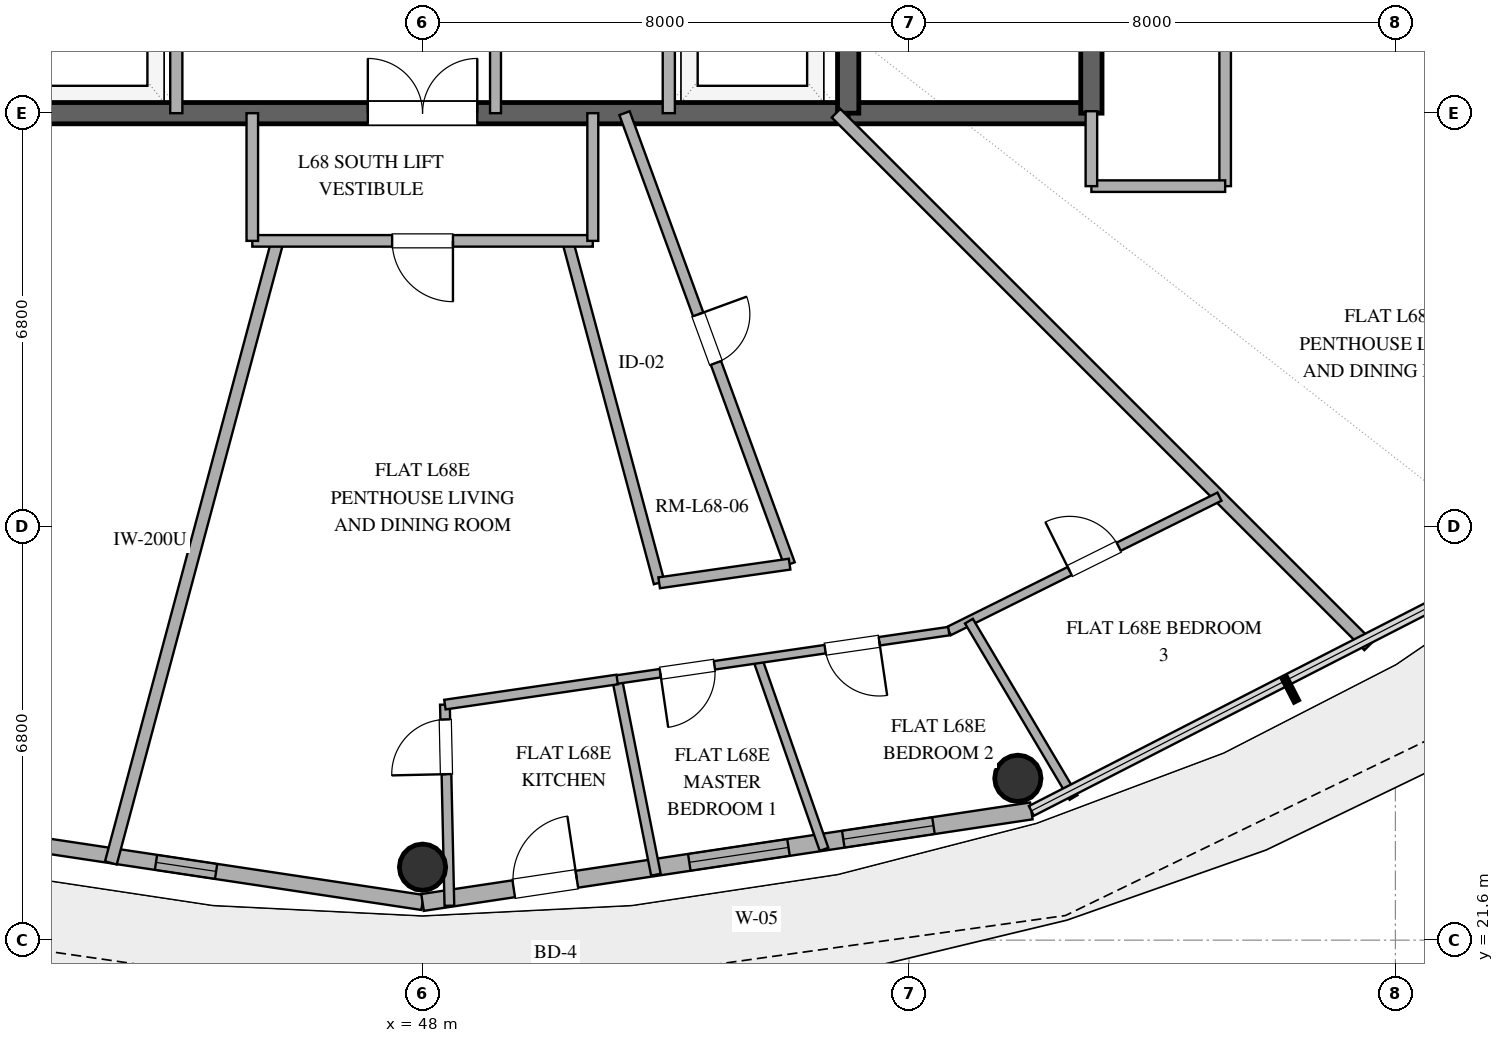
"""IFC4 building model, lengths in metres.
Left out: names, types, materials, properties, quantities, classifications, styles, units other than length and angle.
Written with IfcOpenShell. Run it as: python <this file> out.ifc"""

import sys

from ifc_helpers import new_model, si_unit, direction, frame, frame_2d, origin, origin_2d, place, context, subcontext, project, spatial, rectangle, hollow_circle, extrude, element, fill, save


model = new_model("IFC4")
c1 = context("Model", 3, precision=1e-05, world=origin(), true_north=direction((0.0, 1.0)))
c2 = subcontext(c1, "Body", "Model", "MODEL_VIEW")
j1 = project(units=[si_unit("LENGTHUNIT", "METRE"), si_unit("PLANEANGLEUNIT", "RADIAN")], contexts=[c1])
p1 = place(None, origin())
s1 = spatial("IfcSite", under=j1, at=p1, CompositionType="ELEMENT")
p2 = place(p1, origin())
s2 = spatial("IfcBuilding", under=s1, at=p2, CompositionType="ELEMENT")
p3 = place(p2, frame((0.0, 0.0, 265.8)))
s3 = spatial("IfcBuildingStorey", under=s2, at=p3, CompositionType="ELEMENT", Elevation=265.8)
p4 = place(p3, frame((41.0, 35.2, 0.0), z_axis=(0.0, 0.0, 1.0), x_axis=(1.0, 0.0, 0.0)))
e1 = element("IfcWall", 1, at=p4, inside=s3, PredefinedType="SHEAR", context=c2, shape_type="SweptSolid", body=[
    extrude(rectangle(XDim=14.0, YDim=0.35, at=frame_2d((7.0, 0.0))), origin(), (0.0, 0.0, 1.0), 3.37),
])
p5 = place(p4, frame((6.1, 0.0, 0.0)))
e2 = element("IfcOpeningElement", 2, at=p5, cuts=e1, PredefinedType="OPENING", context=c2, shape_type="SweptSolid", body=[
    extrude(rectangle(XDim=1.8, YDim=2.25, at=frame_2d((0.9, 1.125))), frame((0.0, 0.185, 0.0), z_axis=(0.0, -1.0, 0.0), x_axis=(1.0, 0.0, 0.0)), (0.0, 0.0, 1.0), 0.37),
])
p6 = place(p3, frame((55.0, 35.2, 0.0), z_axis=(0.0, 0.0, 1.0), x_axis=(1.0, 0.0, 0.0)))
e3 = element("IfcWall", 3, at=p6, inside=s3, PredefinedType="SHEAR", context=c2, shape_type="SweptSolid", body=[
    extrude(rectangle(XDim=4.0, YDim=0.35, at=frame_2d((2.0, 0.0))), origin(), (0.0, 0.0, 1.0), 3.37),
])
p7 = place(p3, frame((59.0, 35.2, 0.0), z_axis=(0.0, 0.0, 1.0), x_axis=(0.0, 1.0, 0.0)))
e4 = element("IfcWall", 4, at=p7, inside=s3, PredefinedType="SHEAR", context=c2, shape_type="SweptSolid", body=[
    extrude(rectangle(XDim=13.6, YDim=0.35, at=frame_2d((6.8, 0.0))), origin(), (0.0, 0.0, 1.0), 3.37),
])
p8 = place(p7, frame((1.5, 0.0, 0.0)))
e5 = element("IfcOpeningElement", 5, at=p8, cuts=e4, PredefinedType="OPENING", context=c2, shape_type="SweptSolid", body=[
    extrude(rectangle(XDim=1.2, YDim=2.15, at=frame_2d((0.6, 1.075))), frame((0.0, 0.185, 0.0), z_axis=(0.0, -1.0, 0.0), x_axis=(1.0, 0.0, 0.0)), (0.0, 0.0, 1.0), 0.37),
])
p9 = place(p3, frame((55.0, 35.2, 0.0), z_axis=(0.0, 0.0, 1.0), x_axis=(0.0, 1.0, 0.0)))
e6 = element("IfcWall", 6, at=p9, inside=s3, PredefinedType="SHEAR", context=c2, shape_type="SweptSolid", body=[
    extrude(rectangle(XDim=13.6, YDim=0.35, at=frame_2d((6.8, 0.0))), origin(), (0.0, 0.0, 1.0), 3.37),
])
p10 = place(p9, frame((1.15, 0.0, 0.0)))
e7 = element("IfcOpeningElement", 7, at=p10, cuts=e6, PredefinedType="OPENING", context=c2, shape_type="SweptSolid", body=[
    extrude(rectangle(XDim=1.1, YDim=2.2, at=frame_2d((0.55, 1.1))), frame((0.0, 0.185, 0.0), z_axis=(0.0, -1.0, 0.0), x_axis=(1.0, 0.0, 0.0)), (0.0, 0.0, 1.0), 0.37),
])
for number, where, z_axis, x_axis in (
    (8, (48.0, 22.8, 0.0), (0.0, 0.0, 1.0), (1.0, 0.0, 0.0)),
    (9, (57.791, 24.261, 0.0), (0.0, 0.0, 1.0), (1.0, 0.0, 0.0)),
):
    element("IfcColumn", number, at=place(p3, frame(where, z_axis=z_axis, x_axis=x_axis)), inside=s3, PredefinedType="COLUMN", context=c2, shape_type="SweptSolid", body=[
        extrude(hollow_circle(Radius=0.381, WallThickness=0.025, at=origin_2d()), origin(), (0.0, 0.0, 1.0), 3.37),
    ])
p11 = place(p3, frame((37.987, 23.726, 0.0), z_axis=(0.0, 0.0, 1.0), x_axis=(0.988882522213, -0.148698881169, 0.0)))
e10 = element("IfcWall", 10, at=p11, inside=s3, PredefinedType="SOLIDWALL", context=c2, shape_type="SweptSolid", body=[
    extrude(rectangle(XDim=10.125, YDim=0.25, at=frame_2d((5.062, 0.0))), origin(), (0.0, 0.0, 1.0), 3.37),
])
p12 = place(p11, frame((5.692, 0.0, 0.35)))
e11 = element("IfcOpeningElement", 11, at=p12, cuts=e10, PredefinedType="OPENING", context=c2, shape_type="SweptSolid", body=[
    extrude(rectangle(XDim=1.0, YDim=1.05, at=frame_2d((0.5, 0.525))), frame((0.0, 0.135, 0.0), z_axis=(0.0, -1.0, 0.0), x_axis=(1.0, 0.0, 0.0)), (0.0, 0.0, 1.0), 0.27),
])
p13 = place(p3, frame((48.0, 22.22, 0.0), z_axis=(0.0, 0.0, 1.0), x_axis=(0.988882522213, 0.148698881169, 0.0)))
e12 = element("IfcWall", 12, at=p13, inside=s3, PredefinedType="SOLIDWALL", context=c2, shape_type="SweptSolid", body=[
    extrude(rectangle(XDim=10.125, YDim=0.28, at=frame_2d((5.062, 0.0))), origin(), (0.0, 0.0, 1.0), 3.37),
])
p14 = place(p13, frame((1.516, 0.0, 0.0)))
e13 = element("IfcOpeningElement", 13, at=p14, cuts=e12, PredefinedType="OPENING", context=c2, shape_type="SweptSolid", body=[
    extrude(rectangle(XDim=1.05, YDim=2.2, at=frame_2d((0.525, 1.1))), frame((0.0, 0.15, 0.0), z_axis=(0.0, -1.0, 0.0), x_axis=(1.0, 0.0, 0.0)), (0.0, 0.0, 1.0), 0.3),
])
p15 = place(p13, frame((4.436, 0.0, 0.85)))
e14 = element("IfcOpeningElement", 14, at=p15, cuts=e12, PredefinedType="OPENING", context=c2, shape_type="SweptSolid", body=[
    extrude(rectangle(XDim=1.65, YDim=2.0, at=frame_2d((0.825, 1.0))), frame((0.0, 0.15, 0.0), z_axis=(0.0, -1.0, 0.0), x_axis=(1.0, 0.0, 0.0)), (0.0, 0.0, 1.0), 0.3),
])
p16 = place(p13, frame((6.997, 0.0, 0.85)))
e15 = element("IfcOpeningElement", 15, at=p16, cuts=e12, PredefinedType="OPENING", context=c2, shape_type="SweptSolid", body=[
    extrude(rectangle(XDim=1.5, YDim=2.0, at=frame_2d((0.75, 1.0))), frame((0.0, 0.15, 0.0), z_axis=(0.0, -1.0, 0.0), x_axis=(1.0, 0.0, 0.0)), (0.0, 0.0, 1.0), 0.3),
])
for number, where, z_axis, x_axis in (
    (16, (43.95, 35.2, 0.0), (0.0, 0.0, 1.0), (0.0, 1.0, 0.0)),
    (17, (52.05, 35.2, 0.0), (0.0, 0.0, 1.0), (0.0, 1.0, 0.0)),
):
    element("IfcWall", number, at=place(p3, frame(where, z_axis=z_axis, x_axis=x_axis)), inside=s3, PredefinedType="SOLIDWALL", context=c2, shape_type="SweptSolid", body=[
        extrude(rectangle(XDim=3.2, YDim=0.2, at=frame_2d((1.6, 0.0))), origin(), (0.0, 0.0, 1.0), 2.73),
    ])
p17 = place(p3, frame((49.2, 35.2, 0.0), z_axis=(0.0, 0.0, 1.0), x_axis=(0.0, 1.0, 0.0)))
e18 = element("IfcWall", 18, at=p17, inside=s3, PredefinedType="PLUMBINGWALL", context=c2, shape_type="SweptSolid", body=[
    extrude(rectangle(XDim=3.2, YDim=0.18, at=frame_2d((1.6, 0.0))), origin(), (0.0, 0.0, 1.0), 2.73),
])
p18 = place(p17, frame((1.15, 0.0, 0.0)))
e19 = element("IfcOpeningElement", 19, at=p18, cuts=e18, PredefinedType="OPENING", context=c2, shape_type="SweptSolid", body=[
    extrude(rectangle(XDim=0.9, YDim=2.1, at=frame_2d((0.45, 1.05))), frame((0.0, 0.1, 0.0), z_axis=(0.0, -1.0, 0.0), x_axis=(1.0, 0.0, 0.0)), (0.0, 0.0, 1.0), 0.2),
])
p19 = place(p3, frame((42.874, 22.87, 0.0), z_axis=(0.0, 0.0, 1.0), x_axis=(0.258827496332, 0.965923561749, 0.0)))
e20 = element("IfcWall", 20, at=p19, inside=s3, PredefinedType="PARTITIONING", context=c2, shape_type="SweptSolid", body=[
    extrude(rectangle(XDim=10.591, YDim=0.2, at=frame_2d((5.295, 0.0))), origin(), (0.0, 0.0, 1.0), 2.73),
])
p20 = place(p3, frame((63.561, 26.439, 0.0), z_axis=(0.0, 0.0, 1.0), x_axis=(-0.707106781187, 0.707106781187, 0.0)))
e21 = element("IfcWall", 21, at=p20, inside=s3, PredefinedType="PARTITIONING", context=c2, shape_type="SweptSolid", body=[
    extrude(rectangle(XDim=12.389, YDim=0.2, at=frame_2d((6.195, 0.0))), origin(), (0.0, 0.0, 1.0), 2.73),
])
p21 = place(p3, frame((51.322, 35.2, 0.0), z_axis=(0.0, 0.0, 1.0), x_axis=(0.343730484072, -0.939068343796, 0.0)))
e22 = element("IfcWall", 22, at=p21, inside=s3, PredefinedType="PLUMBINGWALL", context=c2, shape_type="SweptSolid", body=[
    extrude(rectangle(XDim=7.897, YDim=0.18, at=frame_2d((3.949, 0.0))), origin(), (0.0, 0.0, 1.0), 2.73),
])
p22 = place(p21, frame((3.524, 0.0, 0.0)))
e23 = element("IfcOpeningElement", 23, at=p22, cuts=e22, PredefinedType="OPENING", context=c2, shape_type="SweptSolid", body=[
    extrude(rectangle(XDim=0.85, YDim=2.1, at=frame_2d((0.425, 1.05))), frame((0.0, 0.1, 0.0), z_axis=(0.0, -1.0, 0.0), x_axis=(1.0, 0.0, 0.0)), (0.0, 0.0, 1.0), 0.2),
])
p23 = place(p3, frame((51.892, 27.477, 0.0), z_axis=(0.0, 0.0, 1.0), x_axis=(-0.258831810373, 0.965922405755, 0.0)))
e24 = element("IfcWall", 24, at=p23, inside=s3, PredefinedType="PLUMBINGWALL", context=c2, shape_type="SweptSolid", body=[
    extrude(rectangle(XDim=5.822, YDim=0.18, at=frame_2d((2.911, 0.0))), origin(), (0.0, 0.0, 1.0), 2.73),
])
p24 = place(p3, frame((50.8, 33.1, 0.0), z_axis=(0.0, 0.0, 1.0), x_axis=(-1.0, 0.0, 0.0)))
e25 = element("IfcWall", 25, at=p24, inside=s3, PredefinedType="PARTITIONING", context=c2, shape_type="SweptSolid", body=[
    extrude(rectangle(XDim=5.6, YDim=0.19, at=frame_2d((2.8, 0.0))), origin(), (0.0, 0.0, 1.0), 2.73),
])
p25 = place(p24, frame((2.3, 0.0, 0.0)))
e26 = element("IfcOpeningElement", 26, at=p25, cuts=e25, PredefinedType="OPENING", context=c2, shape_type="SweptSolid", body=[
    extrude(rectangle(XDim=1.0, YDim=2.2, at=frame_2d((0.5, 1.1))), frame((0.0, 0.105, 0.0), z_axis=(0.0, -1.0, 0.0), x_axis=(1.0, 0.0, 0.0)), (0.0, 0.0, 1.0), 0.21),
])
p26 = place(p3, frame((56.655, 26.682, 0.0), z_axis=(0.0, 0.0, 1.0), x_axis=(0.895583327025, 0.444893812449, 0.0)))
e27 = element("IfcWall", 27, at=p26, inside=s3, PredefinedType="PARTITIONING", context=c2, shape_type="SweptSolid", body=[
    extrude(rectangle(XDim=4.971, YDim=0.15, at=frame_2d((2.485, 0.0))), origin(), (0.0, 0.0, 1.0), 2.73),
])
p27 = place(p26, frame((2.22, 0.0, 0.0)))
e28 = element("IfcOpeningElement", 28, at=p27, cuts=e27, PredefinedType="OPENING", context=c2, shape_type="SweptSolid", body=[
    extrude(rectangle(XDim=0.9, YDim=2.1, at=frame_2d((0.45, 1.05))), frame((0.0, 0.085, 0.0), z_axis=(0.0, -1.0, 0.0), x_axis=(1.0, 0.0, 0.0)), (0.0, 0.0, 1.0), 0.17),
])
p28 = place(p3, frame((61.2, 38.496, 0.0), z_axis=(0.0, 0.0, 1.0), x_axis=(0.0, -1.0, 0.0)))
e29 = element("IfcWall", 29, at=p28, inside=s3, PredefinedType="PARTITIONING", context=c2, shape_type="SweptSolid", body=[
    extrude(rectangle(XDim=4.496, YDim=0.19, at=frame_2d((2.248, 0.0))), origin(), (0.0, 0.0, 1.0), 2.73),
])
p29 = place(p3, frame((58.706, 23.946, 0.0), z_axis=(0.0, 0.0, 1.0), x_axis=(-0.510016720958, 0.860164486795, 0.0)))
e30 = element("IfcWall", 30, at=p29, inside=s3, PredefinedType="PARTITIONING", context=c2, shape_type="SweptSolid", body=[
    extrude(rectangle(XDim=3.372, YDim=0.15, at=frame_2d((1.686, 0.0))), origin(), (0.0, 0.0, 1.0), 2.73),
])
p30 = place(p3, frame((53.51, 26.223, 0.0), z_axis=(0.0, 0.0, 1.0), x_axis=(0.329694293347, -0.944087746417, 0.0)))
e31 = element("IfcWall", 31, at=p30, inside=s3, PredefinedType="PARTITIONING", context=c2, shape_type="SweptSolid", body=[
    extrude(rectangle(XDim=3.315, YDim=0.15, at=frame_2d((1.658, 0.0))), origin(), (0.0, 0.0, 1.0), 2.73),
])
p31 = place(p3, frame((48.442, 22.166, 0.0), z_axis=(0.0, 0.0, 1.0), x_axis=(-0.022285576985, 0.999751645689, 0.0)))
e32 = element("IfcWall", 32, at=p31, inside=s3, PredefinedType="PLUMBINGWALL", context=c2, shape_type="SweptSolid", body=[
    extrude(rectangle(XDim=3.308, YDim=0.16, at=frame_2d((1.654, 0.0))), origin(), (0.0, 0.0, 1.0), 2.73),
])
p32 = place(p31, frame((2.164, 0.0, 0.0)))
e33 = element("IfcOpeningElement", 33, at=p32, cuts=e32, PredefinedType="OPENING", context=c2, shape_type="SweptSolid", body=[
    extrude(rectangle(XDim=0.9, YDim=2.1, at=frame_2d((0.45, 1.05))), frame((0.0, 0.09, 0.0), z_axis=(0.0, -1.0, 0.0), x_axis=(1.0, 0.0, 0.0)), (0.0, 0.0, 1.0), 0.18),
])
p33 = place(p3, frame((51.201, 25.887, 0.0), z_axis=(0.0, 0.0, 1.0), x_axis=(0.194810759156, -0.980840847496, 0.0)))
e34 = element("IfcWall", 34, at=p33, inside=s3, PredefinedType="PLUMBINGWALL", context=c2, shape_type="SweptSolid", body=[
    extrude(rectangle(XDim=3.273, YDim=0.16, at=frame_2d((1.637, 0.0))), origin(), (0.0, 0.0, 1.0), 2.73),
])
p34 = place(p3, frame((56.655, 26.682, 0.0), z_axis=(0.0, 0.0, 1.0), x_axis=(-0.989532194991, -0.144312283177, 0.0)))
e35 = element("IfcWall", 35, at=p34, inside=s3, PredefinedType="PARTITIONING", context=c2, shape_type="SweptSolid", body=[
    extrude(rectangle(XDim=5.544, YDim=0.14, at=frame_2d((2.772, 0.0))), origin(), (0.0, 0.0, 1.0), 2.73),
])
p35 = place(p34, frame((1.156, 0.0, 0.0)))
e36 = element("IfcOpeningElement", 36, at=p35, cuts=e35, PredefinedType="OPENING", context=c2, shape_type="SweptSolid", body=[
    extrude(rectangle(XDim=0.9, YDim=2.1, at=frame_2d((0.45, 1.05))), frame((0.0, 0.08, 0.0), z_axis=(0.0, -1.0, 0.0), x_axis=(1.0, 0.0, 0.0)), (0.0, 0.0, 1.0), 0.16),
])
p36 = place(p34, frame((3.895, 0.0, 0.0)))
e37 = element("IfcOpeningElement", 37, at=p36, cuts=e35, PredefinedType="OPENING", context=c2, shape_type="SweptSolid", body=[
    extrude(rectangle(XDim=0.9, YDim=2.1, at=frame_2d((0.45, 1.05))), frame((0.0, 0.08, 0.0), z_axis=(0.0, -1.0, 0.0), x_axis=(1.0, 0.0, 0.0)), (0.0, 0.0, 1.0), 0.16),
])
p37 = place(p3, frame((48.368, 25.474, 0.0), z_axis=(0.0, 0.0, 1.0), x_axis=(0.989534249572, 0.144298194456, 0.0)))
e38 = element("IfcWall", 38, at=p37, inside=s3, PredefinedType="PLUMBINGWALL", context=c2, shape_type="SweptSolid", body=[
    extrude(rectangle(XDim=2.863, YDim=0.16, at=frame_2d((1.431, 0.0))), origin(), (0.0, 0.0, 1.0), 2.73),
])
p38 = place(p3, frame((61.2, 34.0, 0.0), z_axis=(0.0, 0.0, 1.0), x_axis=(-1.0, 0.0, 0.0)))
e39 = element("IfcWall", 39, at=p38, inside=s3, PredefinedType="PARTITIONING", context=c2, shape_type="SweptSolid", body=[
    extrude(rectangle(XDim=2.2, YDim=0.19, at=frame_2d((1.1, 0.0))), origin(), (0.0, 0.0, 1.0), 2.73),
])
p39 = place(p3, frame((54.037, 27.784, 0.0), z_axis=(0.0, 0.0, 1.0), x_axis=(-0.989920178177, -0.141626412926, 0.0)))
e40 = element("IfcWall", 40, at=p39, inside=s3, PredefinedType="PLUMBINGWALL", context=c2, shape_type="SweptSolid", body=[
    extrude(rectangle(XDim=2.167, YDim=0.18, at=frame_2d((1.083, 0.0))), origin(), (0.0, 0.0, 1.0), 2.73),
])
p40 = place(p3, frame((45.2, 35.2, 0.0), z_axis=(0.0, 0.0, 1.0), x_axis=(0.0, -1.0, 0.0)))
e41 = element("IfcWall", 41, at=p40, inside=s3, PredefinedType="PARTITIONING", context=c2, shape_type="SweptSolid", body=[
    extrude(rectangle(XDim=2.1, YDim=0.19, at=frame_2d((1.05, 0.0))), origin(), (0.0, 0.0, 1.0), 2.73),
])
p41 = place(p3, frame((50.8, 35.2, 0.0), z_axis=(0.0, 0.0, 1.0), x_axis=(0.0, -1.0, 0.0)))
e42 = element("IfcWall", 42, at=p41, inside=s3, PredefinedType="PLUMBINGWALL", context=c2, shape_type="SweptSolid", body=[
    extrude(rectangle(XDim=2.1, YDim=0.18, at=frame_2d((1.05, 0.0))), origin(), (0.0, 0.0, 1.0), 2.73),
])
p42 = place(p3, frame((59.0, 34.0, 0.0), z_axis=(0.0, 0.0, 1.0), x_axis=(0.0, 1.0, 0.0)))
e43 = element("IfcWall", 43, at=p42, inside=s3, PredefinedType="PARTITIONING", context=c2, shape_type="SweptSolid", body=[
    extrude(rectangle(XDim=1.232, YDim=0.19, at=frame_2d((0.616, 0.0))), origin(), (0.0, 0.0, 1.0), 2.73),
])
p43 = place(p14, origin())
e44 = element("IfcDoor", 44, at=p43, inside=s3, OperationType="SINGLE_SWING_RIGHT", PredefinedType="DOOR", context=c2, shape_type="SweptSolid", body=[
    extrude(rectangle(XDim=1.05, YDim=2.2, at=frame_2d((0.525, 1.1))), frame((0.0, 0.025, 0.0), z_axis=(0.0, -1.0, 0.0), x_axis=(1.0, 0.0, 0.0)), (0.0, 0.0, 1.0), 0.05),
])
fill(e13, e44)
p44 = place(p15, origin())
e45 = element("IfcWindow", 45, at=p44, inside=s3, PartitioningType="SINGLE_PANEL", PredefinedType="WINDOW", context=c2, shape_type="SweptSolid", body=[
    extrude(rectangle(XDim=1.65, YDim=2.0, at=frame_2d((0.825, 1.0))), frame((0.0, 0.03, 0.0), z_axis=(0.0, -1.0, 0.0), x_axis=(1.0, 0.0, 0.0)), (0.0, 0.0, 1.0), 0.06),
])
fill(e14, e45)
p45 = place(p16, origin())
e46 = element("IfcWindow", 46, at=p45, inside=s3, PartitioningType="SINGLE_PANEL", PredefinedType="WINDOW", context=c2, shape_type="SweptSolid", body=[
    extrude(rectangle(XDim=1.5, YDim=2.0, at=frame_2d((0.75, 1.0))), frame((0.0, 0.03, 0.0), z_axis=(0.0, -1.0, 0.0), x_axis=(1.0, 0.0, 0.0)), (0.0, 0.0, 1.0), 0.06),
])
fill(e15, e46)
p46 = place(p12, origin())
e47 = element("IfcWindow", 47, at=p46, inside=s3, PartitioningType="SINGLE_PANEL", PredefinedType="WINDOW", context=c2, shape_type="SweptSolid", body=[
    extrude(rectangle(XDim=1.0, YDim=1.05, at=frame_2d((0.5, 0.525))), frame((0.0, 0.03, 0.0), z_axis=(0.0, -1.0, 0.0), x_axis=(1.0, 0.0, 0.0)), (0.0, 0.0, 1.0), 0.06),
])
fill(e11, e47)
p47 = place(p5, origin())
e48 = element("IfcDoor", 48, at=p47, inside=s3, OperationType="DOUBLE_DOOR_SINGLE_SWING", PredefinedType="DOOR", context=c2, shape_type="SweptSolid", body=[
    extrude(rectangle(XDim=1.8, YDim=2.25, at=frame_2d((0.9, 1.125))), frame((0.0, 0.025, 0.0), z_axis=(0.0, -1.0, 0.0), x_axis=(1.0, 0.0, 0.0)), (0.0, 0.0, 1.0), 0.05),
])
fill(e2, e48)
p48 = place(p22, origin())
e49 = element("IfcDoor", 49, at=p48, inside=s3, OperationType="SINGLE_SWING_LEFT", PredefinedType="DOOR", context=c2, shape_type="SweptSolid", body=[
    extrude(rectangle(XDim=0.85, YDim=2.1, at=frame_2d((0.425, 1.05))), frame((0.0, 0.025, 0.0), z_axis=(0.0, -1.0, 0.0), x_axis=(1.0, 0.0, 0.0)), (0.0, 0.0, 1.0), 0.05),
])
fill(e23, e49)
p49 = place(p25, origin())
e50 = element("IfcDoor", 50, at=p49, inside=s3, OperationType="SINGLE_SWING_LEFT", PredefinedType="DOOR", context=c2, shape_type="SweptSolid", body=[
    extrude(rectangle(XDim=1.0, YDim=2.2, at=frame_2d((0.5, 1.1))), frame((0.0, 0.025, 0.0), z_axis=(0.0, -1.0, 0.0), x_axis=(1.0, 0.0, 0.0)), (0.0, 0.0, 1.0), 0.05),
])
fill(e26, e50)
p50 = place(p27, origin())
e51 = element("IfcDoor", 51, at=p50, inside=s3, OperationType="SINGLE_SWING_LEFT", PredefinedType="DOOR", context=c2, shape_type="SweptSolid", body=[
    extrude(rectangle(XDim=0.9, YDim=2.1, at=frame_2d((0.45, 1.05))), frame((0.0, 0.025, 0.0), z_axis=(0.0, -1.0, 0.0), x_axis=(1.0, 0.0, 0.0)), (0.0, 0.0, 1.0), 0.05),
])
fill(e28, e51)
p51 = place(p32, origin())
e52 = element("IfcDoor", 52, at=p51, inside=s3, OperationType="SINGLE_SWING_LEFT", PredefinedType="DOOR", context=c2, shape_type="SweptSolid", body=[
    extrude(rectangle(XDim=0.9, YDim=2.1, at=frame_2d((0.45, 1.05))), frame((0.0, 0.025, 0.0), z_axis=(0.0, -1.0, 0.0), x_axis=(1.0, 0.0, 0.0)), (0.0, 0.0, 1.0), 0.05),
])
fill(e33, e52)
p52 = place(p35, origin())
e53 = element("IfcDoor", 53, at=p52, inside=s3, OperationType="SINGLE_SWING_LEFT", PredefinedType="DOOR", context=c2, shape_type="SweptSolid", body=[
    extrude(rectangle(XDim=0.9, YDim=2.1, at=frame_2d((0.45, 1.05))), frame((0.0, 0.025, 0.0), z_axis=(0.0, -1.0, 0.0), x_axis=(1.0, 0.0, 0.0)), (0.0, 0.0, 1.0), 0.05),
])
fill(e36, e53)
p53 = place(p36, origin())
e54 = element("IfcDoor", 54, at=p53, inside=s3, OperationType="SINGLE_SWING_RIGHT", PredefinedType="DOOR", context=c2, shape_type="SweptSolid", body=[
    extrude(rectangle(XDim=0.9, YDim=2.1, at=frame_2d((0.45, 1.05))), frame((0.0, 0.025, 0.0), z_axis=(0.0, -1.0, 0.0), x_axis=(1.0, 0.0, 0.0)), (0.0, 0.0, 1.0), 0.05),
])
fill(e37, e54)
save(model, sys.argv[1])
